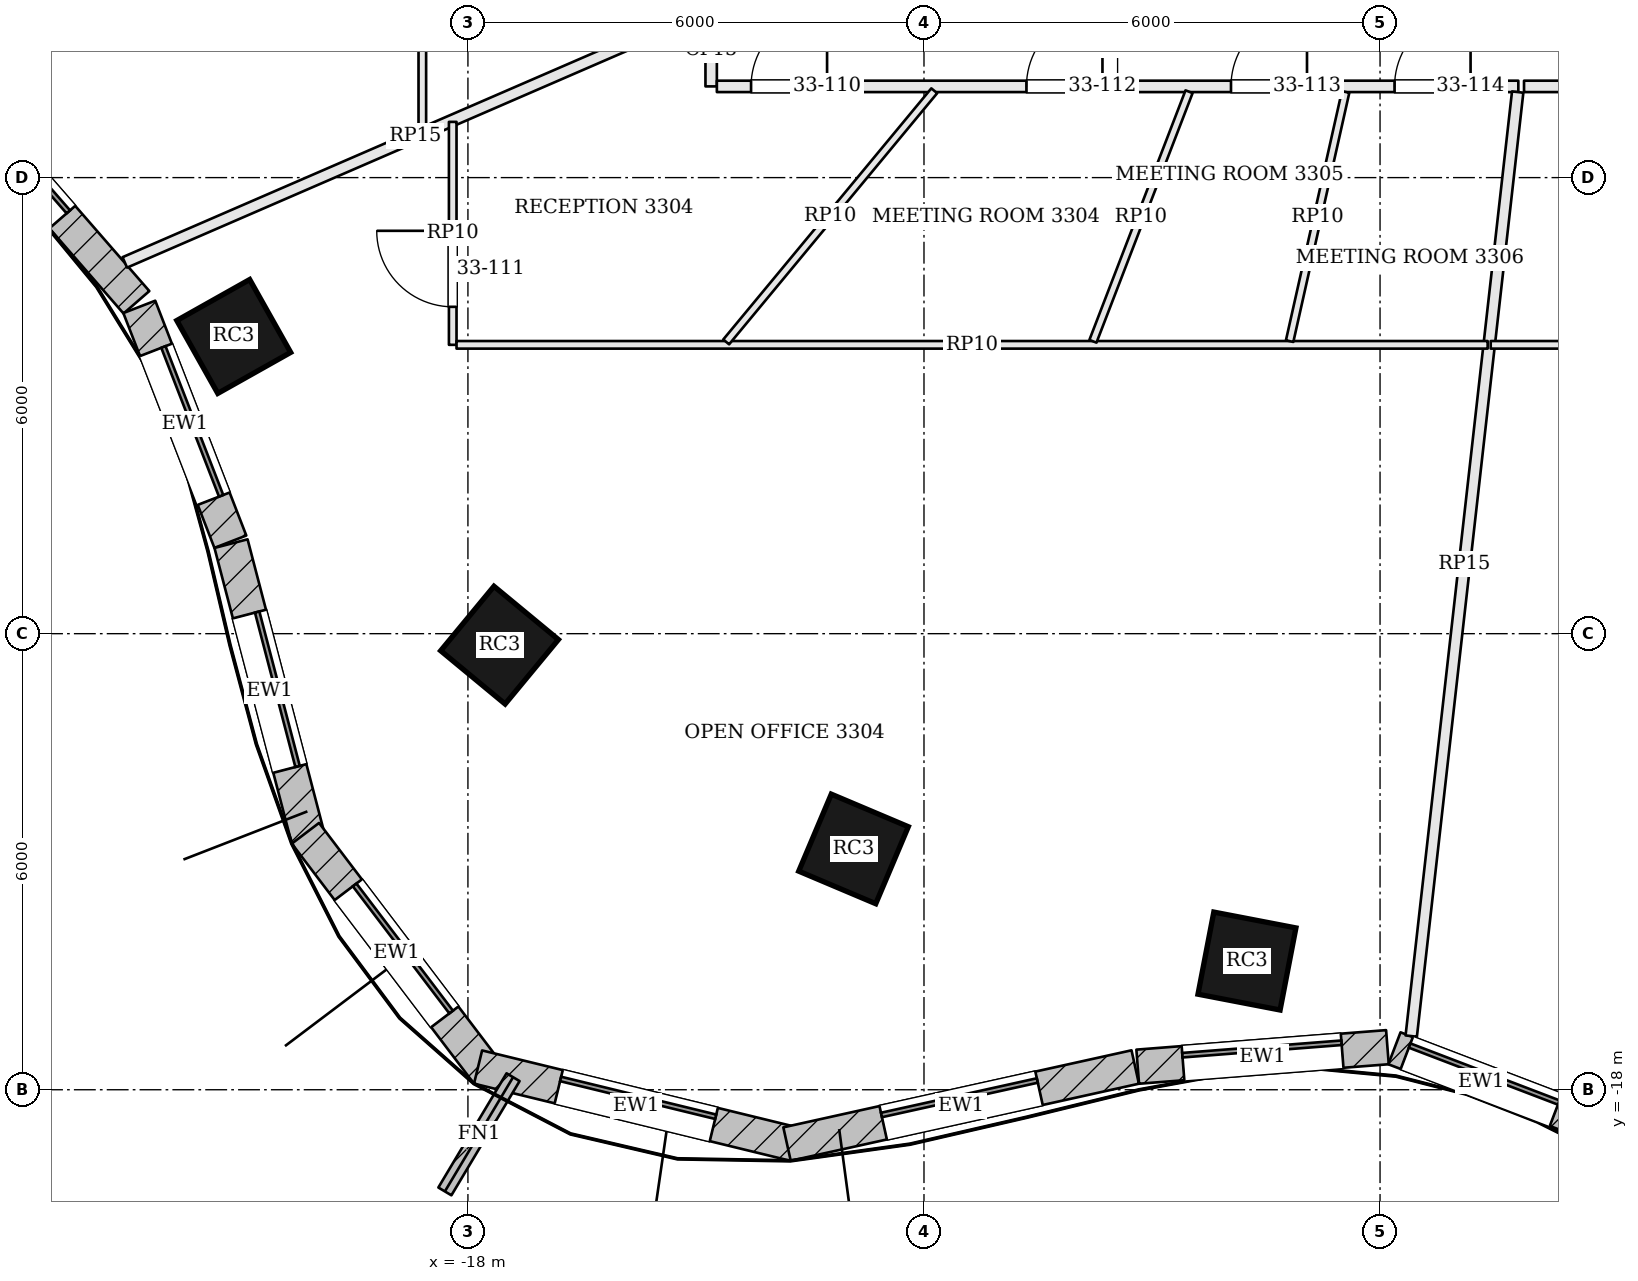
"""IFC4 building model, lengths in metres.
Left out: names, types, materials, properties, quantities, classifications, styles, units other than length and angle.
Written with IfcOpenShell. Run it as: python <this file> out.ifc"""

import sys

from ifc_helpers import new_model, si_unit, direction, frame, frame_2d, origin, origin_2d, place, context, subcontext, project, spatial, rectangle, extrude, element, fill, save


model = new_model("IFC4")
c1 = context("Model", 3, precision=1e-05, world=origin(), true_north=direction((0.0, 1.0)))
c2 = subcontext(c1, "Body", "Model", "MODEL_VIEW")
j1 = project(units=[si_unit("LENGTHUNIT", "METRE"), si_unit("PLANEANGLEUNIT", "RADIAN")], contexts=[c1])
p1 = place(None, origin())
s1 = spatial("IfcSite", under=j1, at=p1, CompositionType="ELEMENT")
p2 = place(p1, origin())
s2 = spatial("IfcBuilding", under=s1, at=p2, CompositionType="ELEMENT")
p3 = place(p2, frame((0.0, 0.0, 138.3)))
s3 = spatial("IfcBuildingStorey", under=s2, at=p3, CompositionType="ELEMENT", Elevation=138.3)
for number, where, z_axis, x_axis in (
    (1, (-21.081, -8.09, 0.0), (0.0, 0.0, 1.0), (0.49, -0.872, 0.0)),
    (2, (-17.584, -12.151, 0.0), (0.0, 0.0, 1.0), (0.771, -0.637, 0.0)),
    (3, (-12.927, -14.832, 0.0), (0.0, 0.0, 1.0), (0.921, -0.389, 0.0)),
    (4, (-7.751, -16.307, 0.0), (0.0, 0.0, 1.0), (0.982, -0.189, 0.0)),
):
    element("IfcColumn", number, at=place(p3, frame(where, z_axis=z_axis, x_axis=x_axis)), inside=s3, PredefinedType="COLUMN", context=c2, shape_type="SweptSolid", body=[
        extrude(rectangle(XDim=1.1, YDim=1.1, at=origin_2d()), origin(), (0.0, 0.0, 1.0), 3.9),
    ])
p4 = place(p3, frame((-25.691, -3.815, 0.0), z_axis=(0.0, 0.0, 1.0), x_axis=(0.656552883353, -0.754279995334, 0.0)))
e5 = element("IfcWall", 5, at=p4, inside=s3, PredefinedType="SOLIDWALL", context=c2, shape_type="SweptSolid", body=[
    extrude(rectangle(XDim=5.071, YDim=0.45, at=frame_2d((2.536, 0.0))), origin(), (0.0, 0.0, 1.0), 3.7),
])
p5 = place(p4, frame((1.486, 0.0, 0.9)))
e6 = element("IfcOpeningElement", 6, at=p5, cuts=e5, PredefinedType="OPENING", context=c2, shape_type="SweptSolid", body=[
    extrude(rectangle(XDim=2.1, YDim=2.3, at=frame_2d((1.05, 1.15))), frame((0.0, 0.235, 0.0), z_axis=(0.0, -1.0, 0.0), x_axis=(1.0, 0.0, 0.0)), (0.0, 0.0, 1.0), 0.47),
])
p6 = place(p3, frame((-22.323, -7.701, 0.0), z_axis=(0.0, 0.0, 1.0), x_axis=(0.361550075906, -0.932352692178, 0.0)))
e7 = element("IfcWall", 7, at=p6, inside=s3, PredefinedType="SOLIDWALL", context=c2, shape_type="SweptSolid", body=[
    extrude(rectangle(XDim=3.313, YDim=0.45, at=frame_2d((1.657, 0.0))), origin(), (0.0, 0.0, 1.0), 3.7),
])
p7 = place(p6, frame((0.607, 0.0, 0.9)))
e8 = element("IfcOpeningElement", 8, at=p7, cuts=e7, PredefinedType="OPENING", context=c2, shape_type="SweptSolid", body=[
    extrude(rectangle(XDim=2.1, YDim=2.3, at=frame_2d((1.05, 1.15))), frame((0.0, 0.235, 0.0), z_axis=(0.0, -1.0, 0.0), x_axis=(1.0, 0.0, 0.0)), (0.0, 0.0, 1.0), 0.47),
])
p8 = place(p3, frame((-21.117, -10.815, 0.0), z_axis=(0.0, 0.0, 1.0), x_axis=(0.253065392985, -0.967449175344, 0.0)))
e9 = element("IfcWall", 9, at=p8, inside=s3, PredefinedType="SOLIDWALL", context=c2, shape_type="SweptSolid", body=[
    extrude(rectangle(XDim=4.015, YDim=0.45, at=frame_2d((2.008, 0.0))), origin(), (0.0, 0.0, 1.0), 3.7),
])
p9 = place(p8, frame((0.958, 0.0, 0.9)))
e10 = element("IfcOpeningElement", 10, at=p9, cuts=e9, PredefinedType="OPENING", context=c2, shape_type="SweptSolid", body=[
    extrude(rectangle(XDim=2.1, YDim=2.3, at=frame_2d((1.05, 1.15))), frame((0.0, 0.235, 0.0), z_axis=(0.0, -1.0, 0.0), x_axis=(1.0, 0.0, 0.0)), (0.0, 0.0, 1.0), 0.47),
])
p10 = place(p3, frame((-20.138, -14.626, 0.0), z_axis=(0.0, 0.0, 1.0), x_axis=(0.604591324894, -0.796535830872, 0.0)))
e11 = element("IfcWall", 11, at=p10, inside=s3, PredefinedType="SOLIDWALL", context=c2, shape_type="SweptSolid", body=[
    extrude(rectangle(XDim=3.965, YDim=0.45, at=frame_2d((1.982, 0.0))), origin(), (0.0, 0.0, 1.0), 3.7),
])
p11 = place(p10, frame((0.932, 0.0, 0.9)))
e12 = element("IfcOpeningElement", 12, at=p11, cuts=e11, PredefinedType="OPENING", context=c2, shape_type="SweptSolid", body=[
    extrude(rectangle(XDim=2.1, YDim=2.3, at=frame_2d((1.05, 1.15))), frame((0.0, 0.235, 0.0), z_axis=(0.0, -1.0, 0.0), x_axis=(1.0, 0.0, 0.0)), (0.0, 0.0, 1.0), 0.47),
])
p12 = place(p3, frame((-17.867, -17.701, 0.0), z_axis=(0.0, 0.0, 1.0), x_axis=(0.971546885012, -0.236847314156, 0.0)))
e13 = element("IfcWall", 13, at=p12, inside=s3, PredefinedType="SOLIDWALL", context=c2, shape_type="SweptSolid", body=[
    extrude(rectangle(XDim=4.285, YDim=0.45, at=frame_2d((2.143, 0.0))), origin(), (0.0, 0.0, 1.0), 3.7),
])
p13 = place(p12, frame((1.093, 0.0, 0.9)))
e14 = element("IfcOpeningElement", 14, at=p13, cuts=e13, PredefinedType="OPENING", context=c2, shape_type="SweptSolid", body=[
    extrude(rectangle(XDim=2.1, YDim=2.3, at=frame_2d((1.05, 1.15))), frame((0.0, 0.235, 0.0), z_axis=(0.0, -1.0, 0.0), x_axis=(1.0, 0.0, 0.0)), (0.0, 0.0, 1.0), 0.47),
])
p14 = place(p3, frame((-13.802, -18.715, 0.0), z_axis=(0.0, 0.0, 1.0), x_axis=(0.976380129166, 0.216059814331, 0.0)))
e15 = element("IfcWall", 15, at=p14, inside=s3, PredefinedType="SOLIDWALL", context=c2, shape_type="SweptSolid", body=[
    extrude(rectangle(XDim=4.692, YDim=0.45, at=frame_2d((2.346, 0.0))), origin(), (0.0, 0.0, 1.0), 3.7),
])
p15 = place(p14, frame((1.296, 0.0, 0.9)))
e16 = element("IfcOpeningElement", 16, at=p15, cuts=e15, PredefinedType="OPENING", context=c2, shape_type="SweptSolid", body=[
    extrude(rectangle(XDim=2.1, YDim=2.3, at=frame_2d((1.05, 1.15))), frame((0.0, 0.235, 0.0), z_axis=(0.0, -1.0, 0.0), x_axis=(1.0, 0.0, 0.0)), (0.0, 0.0, 1.0), 0.47),
])
p16 = place(p3, frame((-9.188, -17.697, 0.0), z_axis=(0.0, 0.0, 1.0), x_axis=(0.996964028691, 0.077863505548, 0.0)))
e17 = element("IfcWall", 17, at=p16, inside=s3, PredefinedType="SOLIDWALL", context=c2, shape_type="SweptSolid", body=[
    extrude(rectangle(XDim=3.295, YDim=0.45, at=frame_2d((1.648, 0.0))), origin(), (0.0, 0.0, 1.0), 3.7),
])
p17 = place(p16, frame((0.598, 0.0, 0.9)))
e18 = element("IfcOpeningElement", 18, at=p17, cuts=e17, PredefinedType="OPENING", context=c2, shape_type="SweptSolid", body=[
    extrude(rectangle(XDim=2.1, YDim=2.3, at=frame_2d((1.05, 1.15))), frame((0.0, 0.235, 0.0), z_axis=(0.0, -1.0, 0.0), x_axis=(1.0, 0.0, 0.0)), (0.0, 0.0, 1.0), 0.47),
])
p18 = place(p3, frame((-5.811, -17.455, 0.0), z_axis=(0.0, 0.0, 1.0), x_axis=(0.934122271306, -0.35695319336, 0.0)))
e19 = element("IfcWall", 19, at=p18, inside=s3, PredefinedType="SOLIDWALL", context=c2, shape_type="SweptSolid", body=[
    extrude(rectangle(XDim=2.448, YDim=0.45, at=frame_2d((1.224, 0.0))), origin(), (0.0, 0.0, 1.0), 3.7),
])
p19 = place(p18, frame((0.174, 0.0, 0.9)))
e20 = element("IfcOpeningElement", 20, at=p19, cuts=e19, PredefinedType="OPENING", context=c2, shape_type="SweptSolid", body=[
    extrude(rectangle(XDim=2.1, YDim=2.3, at=frame_2d((1.05, 1.15))), frame((0.0, 0.235, 0.0), z_axis=(0.0, -1.0, 0.0), x_axis=(1.0, 0.0, 0.0)), (0.0, 0.0, 1.0), 0.47),
])
p20 = place(p3, frame((-17.406, -17.835, 0.0), z_axis=(0.0, 0.0, 1.0), x_axis=(-0.512648290506, -0.858598701514, 0.0)))
e21 = element("IfcWall", 21, at=p20, inside=s3, PredefinedType="SOLIDWALL", context=c2, shape_type="SweptSolid", body=[
    extrude(rectangle(XDim=1.75, YDim=0.2, at=frame_2d((0.875, 0.0))), origin(), (0.0, 0.0, 1.0), 3.7),
])
p21 = place(p3, frame((-22.514, -7.116, 0.0), z_axis=(0.0, 0.0, 1.0), x_axis=(0.917457618692, 0.397833530392, 0.0)))
e22 = element("IfcWall", 22, at=p21, inside=s3, PredefinedType="PARTITIONING", context=c2, shape_type="SweptSolid", body=[
    extrude(rectangle(XDim=8.333, YDim=0.15, at=frame_2d((4.167, 0.0))), origin(), (0.0, 0.0, 1.0), 3.198),
])
p22 = place(p3, frame((-14.8, -3.846, 0.0), z_axis=(0.0, 0.0, 1.0), x_axis=(0.0, -1.0, 0.0)))
e23 = element("IfcWall", 23, at=p22, inside=s3, PredefinedType="PARTITIONING", context=c2, shape_type="SweptSolid", body=[
    extrude(rectangle(XDim=0.954, YDim=0.15, at=frame_2d((0.477, 0.0))), origin(), (0.0, 0.0, 1.0), 3.198),
])
p23 = place(p3, frame((-14.725, -4.8, 0.0), z_axis=(0.0, 0.0, 1.0), x_axis=(1.0, 0.0, 0.0)))
e24 = element("IfcWall", 24, at=p23, inside=s3, PredefinedType="PARTITIONING", context=c2, shape_type="SweptSolid", body=[
    extrude(rectangle(XDim=10.544, YDim=0.15, at=frame_2d((5.272, 0.0))), origin(), (0.0, 0.0, 1.0), 3.198),
])
p24 = place(p23, frame((0.45, 0.0, 0.0)))
e25 = element("IfcOpeningElement", 25, at=p24, cuts=e24, PredefinedType="OPENING", context=c2, shape_type="SweptSolid", body=[
    extrude(rectangle(XDim=1.0, YDim=2.1, at=frame_2d((0.5, 1.05))), frame((0.0, 0.085, 0.0), z_axis=(0.0, -1.0, 0.0), x_axis=(1.0, 0.0, 0.0)), (0.0, 0.0, 1.0), 0.17),
])
p25 = place(p23, frame((4.073, 0.0, 0.0)))
e26 = element("IfcOpeningElement", 26, at=p25, cuts=e24, PredefinedType="OPENING", context=c2, shape_type="SweptSolid", body=[
    extrude(rectangle(XDim=1.0, YDim=2.4, at=frame_2d((0.5, 1.2))), frame((0.0, 0.085, 0.0), z_axis=(0.0, -1.0, 0.0), x_axis=(1.0, 0.0, 0.0)), (0.0, 0.0, 1.0), 0.17),
])
p26 = place(p23, frame((6.764, 0.0, 0.0)))
e27 = element("IfcOpeningElement", 27, at=p26, cuts=e24, PredefinedType="OPENING", context=c2, shape_type="SweptSolid", body=[
    extrude(rectangle(XDim=1.0, YDim=2.4, at=frame_2d((0.5, 1.2))), frame((0.0, 0.085, 0.0), z_axis=(0.0, -1.0, 0.0), x_axis=(1.0, 0.0, 0.0)), (0.0, 0.0, 1.0), 0.17),
])
p27 = place(p23, frame((8.916, 0.0, 0.0)))
e28 = element("IfcOpeningElement", 28, at=p27, cuts=e24, PredefinedType="OPENING", context=c2, shape_type="SweptSolid", body=[
    extrude(rectangle(XDim=1.0, YDim=2.4, at=frame_2d((0.5, 1.2))), frame((0.0, 0.085, 0.0), z_axis=(0.0, -1.0, 0.0), x_axis=(1.0, 0.0, 0.0)), (0.0, 0.0, 1.0), 0.17),
])
p28 = place(p3, frame((-5.59, -17.294, 0.0), z_axis=(0.0, 0.0, 1.0), x_axis=(0.112047950982, 0.993702800983, 0.0)))
e29 = element("IfcWall", 29, at=p28, inside=s3, PredefinedType="PARTITIONING", context=c2, shape_type="SweptSolid", body=[
    extrude(rectangle(XDim=12.498, YDim=0.15, at=frame_2d((6.249, 0.0))), origin(), (0.0, 0.0, 1.0), 3.198),
])
p29 = place(p3, frame((-4.106, -4.8, 0.0), z_axis=(0.0, 0.0, 1.0), x_axis=(1.0, 0.0, 0.0)))
e30 = element("IfcWall", 30, at=p29, inside=s3, PredefinedType="PARTITIONING", context=c2, shape_type="SweptSolid", body=[
    extrude(rectangle(XDim=14.117, YDim=0.15, at=frame_2d((7.059, 0.0))), origin(), (0.0, 0.0, 1.0), 3.198),
])
p30 = place(p29, frame((2.396, 0.0, 0.0)))
e31 = element("IfcOpeningElement", 31, at=p30, cuts=e30, PredefinedType="OPENING", context=c2, shape_type="SweptSolid", body=[
    extrude(rectangle(XDim=1.8, YDim=2.1, at=frame_2d((0.9, 1.05))), frame((0.0, 0.085, 0.0), z_axis=(0.0, -1.0, 0.0), x_axis=(1.0, 0.0, 0.0)), (0.0, 0.0, 1.0), 0.17),
])
p31 = place(p29, frame((8.053, 0.0, 0.0)))
e32 = element("IfcOpeningElement", 32, at=p31, cuts=e30, PredefinedType="OPENING", context=c2, shape_type="SweptSolid", body=[
    extrude(rectangle(XDim=1.0, YDim=2.4, at=frame_2d((0.5, 1.2))), frame((0.0, 0.085, 0.0), z_axis=(0.0, -1.0, 0.0), x_axis=(1.0, 0.0, 0.0)), (0.0, 0.0, 1.0), 0.17),
])
p32 = place(p3, frame((-18.6, -5.397, 0.0), z_axis=(0.0, 0.0, 1.0), x_axis=(0.0, 1.0, 0.0)))
e33 = element("IfcWall", 33, at=p32, inside=s3, PredefinedType="PARTITIONING", context=c2, shape_type="SweptSolid", body=[
    extrude(rectangle(XDim=16.919, YDim=0.1, at=frame_2d((8.459, 0.0))), origin(), (0.0, 0.0, 1.0), 3.184),
])
p33 = place(p32, frame((1.975, 0.0, 0.0)))
e34 = element("IfcOpeningElement", 34, at=p33, cuts=e33, PredefinedType="OPENING", context=c2, shape_type="SweptSolid", body=[
    extrude(rectangle(XDim=0.9, YDim=2.1, at=frame_2d((0.45, 1.05))), frame((0.0, 0.06, 0.0), z_axis=(0.0, -1.0, 0.0), x_axis=(1.0, 0.0, 0.0)), (0.0, 0.0, 1.0), 0.12),
])
p34 = place(p32, frame((7.95, 0.0, 0.0)))
e35 = element("IfcOpeningElement", 35, at=p34, cuts=e33, PredefinedType="OPENING", context=c2, shape_type="SweptSolid", body=[
    extrude(rectangle(XDim=1.0, YDim=2.4, at=frame_2d((0.5, 1.2))), frame((0.0, 0.06, 0.0), z_axis=(0.0, -1.0, 0.0), x_axis=(1.0, 0.0, 0.0)), (0.0, 0.0, 1.0), 0.12),
])
p35 = place(p3, frame((-18.2, -8.2, 0.0), z_axis=(0.0, 0.0, 1.0), x_axis=(0.0, 1.0, 0.0)))
e36 = element("IfcWall", 36, at=p35, inside=s3, PredefinedType="PARTITIONING", context=c2, shape_type="SweptSolid", body=[
    extrude(rectangle(XDim=2.933, YDim=0.1, at=frame_2d((1.467, 0.0))), origin(), (0.0, 0.0, 1.0), 3.184),
])
p36 = place(p35, frame((0.5, 0.0, 0.0)))
e37 = element("IfcOpeningElement", 37, at=p36, cuts=e36, PredefinedType="OPENING", context=c2, shape_type="SweptSolid", body=[
    extrude(rectangle(XDim=1.0, YDim=2.1, at=frame_2d((0.5, 1.05))), frame((0.0, 0.06, 0.0), z_axis=(0.0, -1.0, 0.0), x_axis=(1.0, 0.0, 0.0)), (0.0, 0.0, 1.0), 0.12),
])
p37 = place(p3, frame((-4.584, -8.2, 0.0), z_axis=(0.0, 0.0, 1.0), x_axis=(-1.0, 0.0, 0.0)))
e38 = element("IfcWall", 38, at=p37, inside=s3, PredefinedType="PARTITIONING", context=c2, shape_type="SweptSolid", body=[
    extrude(rectangle(XDim=13.566, YDim=0.1, at=frame_2d((6.783, 0.0))), origin(), (0.0, 0.0, 1.0), 3.184),
])
p38 = place(p3, frame((-11.865, -4.858, 0.0), z_axis=(0.0, 0.0, 1.0), x_axis=(-0.638010152626, -0.770027950886, 0.0)))
e39 = element("IfcWall", 39, at=p38, inside=s3, PredefinedType="PARTITIONING", context=c2, shape_type="SweptSolid", body=[
    extrude(rectangle(XDim=4.29, YDim=0.1, at=frame_2d((2.145, 0.0))), origin(), (0.0, 0.0, 1.0), 3.184),
])
p39 = place(p3, frame((-8.513, -4.87, 0.0), z_axis=(0.0, 0.0, 1.0), x_axis=(-0.359444024243, -0.933166648266, 0.0)))
e40 = element("IfcWall", 40, at=p39, inside=s3, PredefinedType="PARTITIONING", context=c2, shape_type="SweptSolid", body=[
    extrude(rectangle(XDim=3.518, YDim=0.1, at=frame_2d((1.759, 0.0))), origin(), (0.0, 0.0, 1.0), 3.184),
])
p40 = place(p3, frame((-6.453, -4.873, 0.0), z_axis=(0.0, 0.0, 1.0), x_axis=(-0.21917670953, -0.975685179758, 0.0)))
e41 = element("IfcWall", 41, at=p40, inside=s3, PredefinedType="PARTITIONING", context=c2, shape_type="SweptSolid", body=[
    extrude(rectangle(XDim=3.36, YDim=0.1, at=frame_2d((1.68, 0.0))), origin(), (0.0, 0.0, 1.0), 3.184),
])
p41 = place(p3, frame((11.76, -8.2, 0.0), z_axis=(0.0, 0.0, 1.0), x_axis=(-1.0, 0.0, 0.0)))
e42 = element("IfcWall", 42, at=p41, inside=s3, PredefinedType="PARTITIONING", context=c2, shape_type="SweptSolid", body=[
    extrude(rectangle(XDim=16.305, YDim=0.1, at=frame_2d((8.152, 0.0))), origin(), (0.0, 0.0, 1.0), 3.184),
])
p42 = place(p41, frame((11.985, 0.0, 0.0)))
e43 = element("IfcOpeningElement", 43, at=p42, cuts=e42, PredefinedType="OPENING", context=c2, shape_type="SweptSolid", body=[
    extrude(rectangle(XDim=1.0, YDim=2.1, at=frame_2d((0.5, 1.05))), frame((0.0, 0.06, 0.0), z_axis=(0.0, -1.0, 0.0), x_axis=(1.0, 0.0, 0.0)), (0.0, 0.0, 1.0), 0.12),
])
p43 = place(p41, frame((1.674, 0.0, 0.0)))
e44 = element("IfcOpeningElement", 44, at=p43, cuts=e42, PredefinedType="OPENING", context=c2, shape_type="SweptSolid", body=[
    extrude(rectangle(XDim=0.9, YDim=2.1, at=frame_2d((0.45, 1.05))), frame((0.0, 0.06, 0.0), z_axis=(0.0, -1.0, 0.0), x_axis=(1.0, 0.0, 0.0)), (0.0, 0.0, 1.0), 0.12),
])
p44 = place(p5, origin())
e45 = element("IfcWindow", 45, at=p44, inside=s3, PartitioningType="SINGLE_PANEL", PredefinedType="WINDOW", context=c2, shape_type="SweptSolid", body=[
    extrude(rectangle(XDim=2.1, YDim=2.3, at=frame_2d((1.05, 1.15))), frame((0.0, 0.135, 0.0), z_axis=(0.0, -1.0, 0.0), x_axis=(1.0, 0.0, 0.0)), (0.0, 0.0, 1.0), 0.06),
])
fill(e6, e45)
p45 = place(p7, origin())
e46 = element("IfcWindow", 46, at=p45, inside=s3, PartitioningType="SINGLE_PANEL", PredefinedType="WINDOW", context=c2, shape_type="SweptSolid", body=[
    extrude(rectangle(XDim=2.1, YDim=2.3, at=frame_2d((1.05, 1.15))), frame((0.0, 0.135, 0.0), z_axis=(0.0, -1.0, 0.0), x_axis=(1.0, 0.0, 0.0)), (0.0, 0.0, 1.0), 0.06),
])
fill(e8, e46)
p46 = place(p9, origin())
e47 = element("IfcWindow", 47, at=p46, inside=s3, PartitioningType="SINGLE_PANEL", PredefinedType="WINDOW", context=c2, shape_type="SweptSolid", body=[
    extrude(rectangle(XDim=2.1, YDim=2.3, at=frame_2d((1.05, 1.15))), frame((0.0, 0.135, 0.0), z_axis=(0.0, -1.0, 0.0), x_axis=(1.0, 0.0, 0.0)), (0.0, 0.0, 1.0), 0.06),
])
fill(e10, e47)
p47 = place(p11, origin())
e48 = element("IfcWindow", 48, at=p47, inside=s3, PartitioningType="SINGLE_PANEL", PredefinedType="WINDOW", context=c2, shape_type="SweptSolid", body=[
    extrude(rectangle(XDim=2.1, YDim=2.3, at=frame_2d((1.05, 1.15))), frame((0.0, 0.135, 0.0), z_axis=(0.0, -1.0, 0.0), x_axis=(1.0, 0.0, 0.0)), (0.0, 0.0, 1.0), 0.06),
])
fill(e12, e48)
p48 = place(p13, origin())
e49 = element("IfcWindow", 49, at=p48, inside=s3, PartitioningType="SINGLE_PANEL", PredefinedType="WINDOW", context=c2, shape_type="SweptSolid", body=[
    extrude(rectangle(XDim=2.1, YDim=2.3, at=frame_2d((1.05, 1.15))), frame((0.0, 0.135, 0.0), z_axis=(0.0, -1.0, 0.0), x_axis=(1.0, 0.0, 0.0)), (0.0, 0.0, 1.0), 0.06),
])
fill(e14, e49)
p49 = place(p15, origin())
e50 = element("IfcWindow", 50, at=p49, inside=s3, PartitioningType="SINGLE_PANEL", PredefinedType="WINDOW", context=c2, shape_type="SweptSolid", body=[
    extrude(rectangle(XDim=2.1, YDim=2.3, at=frame_2d((1.05, 1.15))), frame((0.0, 0.135, 0.0), z_axis=(0.0, -1.0, 0.0), x_axis=(1.0, 0.0, 0.0)), (0.0, 0.0, 1.0), 0.06),
])
fill(e16, e50)
p50 = place(p17, origin())
e51 = element("IfcWindow", 51, at=p50, inside=s3, PartitioningType="SINGLE_PANEL", PredefinedType="WINDOW", context=c2, shape_type="SweptSolid", body=[
    extrude(rectangle(XDim=2.1, YDim=2.3, at=frame_2d((1.05, 1.15))), frame((0.0, 0.135, 0.0), z_axis=(0.0, -1.0, 0.0), x_axis=(1.0, 0.0, 0.0)), (0.0, 0.0, 1.0), 0.06),
])
fill(e18, e51)
p51 = place(p19, origin())
e52 = element("IfcWindow", 52, at=p51, inside=s3, PartitioningType="SINGLE_PANEL", PredefinedType="WINDOW", context=c2, shape_type="SweptSolid", body=[
    extrude(rectangle(XDim=2.1, YDim=2.3, at=frame_2d((1.05, 1.15))), frame((0.0, 0.135, 0.0), z_axis=(0.0, -1.0, 0.0), x_axis=(1.0, 0.0, 0.0)), (0.0, 0.0, 1.0), 0.06),
])
fill(e20, e52)
p52 = place(p24, origin())
e53 = element("IfcDoor", 53, at=p52, inside=s3, OperationType="SINGLE_SWING_RIGHT", PredefinedType="DOOR", context=c2, shape_type="SweptSolid", body=[
    extrude(rectangle(XDim=1.0, YDim=2.1, at=frame_2d((0.5, 1.05))), frame((0.0, 0.025, 0.0), z_axis=(0.0, -1.0, 0.0), x_axis=(1.0, 0.0, 0.0)), (0.0, 0.0, 1.0), 0.05),
])
fill(e25, e53)
p53 = place(p36, origin())
e54 = element("IfcDoor", 54, at=p53, inside=s3, OperationType="SINGLE_SWING_RIGHT", PredefinedType="DOOR", context=c2, shape_type="SweptSolid", body=[
    extrude(rectangle(XDim=1.0, YDim=2.1, at=frame_2d((0.5, 1.05))), frame((0.0, 0.025, 0.0), z_axis=(0.0, -1.0, 0.0), x_axis=(1.0, 0.0, 0.0)), (0.0, 0.0, 1.0), 0.05),
])
fill(e37, e54)
p54 = place(p25, origin())
e55 = element("IfcDoor", 55, at=p54, inside=s3, OperationType="SINGLE_SWING_RIGHT", PredefinedType="DOOR", context=c2, shape_type="SweptSolid", body=[
    extrude(rectangle(XDim=1.0, YDim=2.4, at=frame_2d((0.5, 1.2))), frame((0.0, 0.025, 0.0), z_axis=(0.0, -1.0, 0.0), x_axis=(1.0, 0.0, 0.0)), (0.0, 0.0, 1.0), 0.05),
])
fill(e26, e55)
p55 = place(p26, origin())
e56 = element("IfcDoor", 56, at=p55, inside=s3, OperationType="SINGLE_SWING_RIGHT", PredefinedType="DOOR", context=c2, shape_type="SweptSolid", body=[
    extrude(rectangle(XDim=1.0, YDim=2.4, at=frame_2d((0.5, 1.2))), frame((0.0, 0.025, 0.0), z_axis=(0.0, -1.0, 0.0), x_axis=(1.0, 0.0, 0.0)), (0.0, 0.0, 1.0), 0.05),
])
fill(e27, e56)
p56 = place(p27, origin())
e57 = element("IfcDoor", 57, at=p56, inside=s3, OperationType="SINGLE_SWING_RIGHT", PredefinedType="DOOR", context=c2, shape_type="SweptSolid", body=[
    extrude(rectangle(XDim=1.0, YDim=2.4, at=frame_2d((0.5, 1.2))), frame((0.0, 0.025, 0.0), z_axis=(0.0, -1.0, 0.0), x_axis=(1.0, 0.0, 0.0)), (0.0, 0.0, 1.0), 0.05),
])
fill(e28, e57)
save(model, sys.argv[1])
